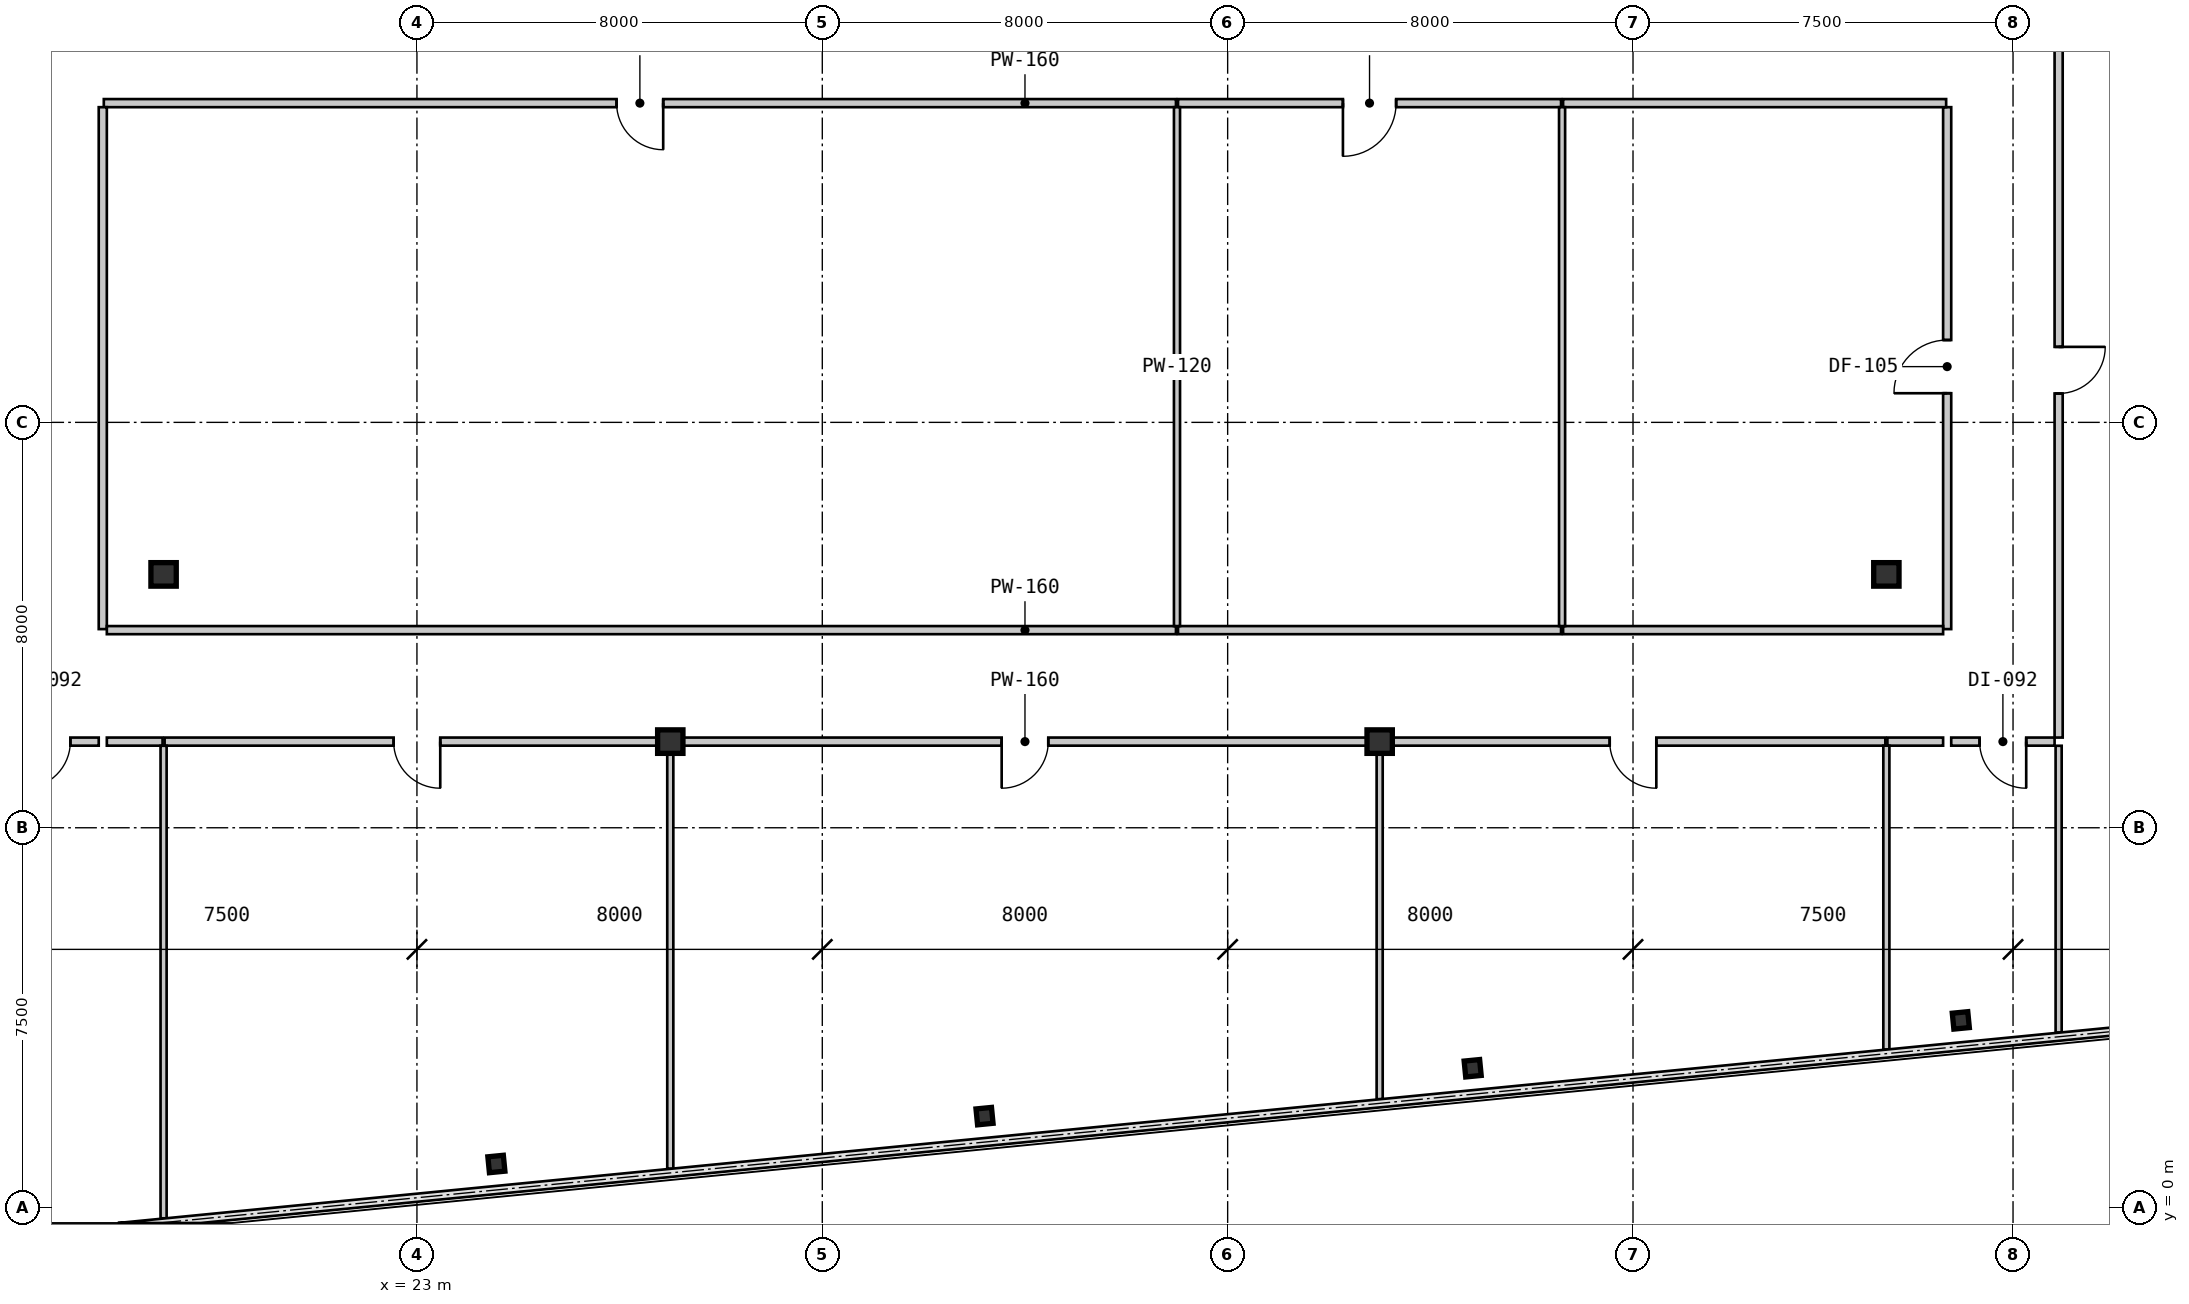
"""IFC4 building model, lengths in metres.
Left out: names, types, materials, properties, quantities, classifications, styles, units other than length and angle.
Written with IfcOpenShell. Run it as: python <this file> out.ifc"""

import sys

from ifc_helpers import new_model, si_unit, direction, frame, frame_2d, origin, origin_2d, place, context, subcontext, project, spatial, rectangle, i_section, extrude, source, transform, mapped, element, fill, save


model = new_model("IFC4")
c1 = context("Model", 3, precision=1e-05, world=origin(), true_north=direction((0.0, 1.0)))
c2 = subcontext(c1, "Body", "Model", "MODEL_VIEW")
j1 = project(units=[si_unit("LENGTHUNIT", "METRE"), si_unit("PLANEANGLEUNIT", "RADIAN")], contexts=[c1])
p1 = place(None, origin())
s1 = spatial("IfcSite", under=j1, at=p1, CompositionType="ELEMENT")
p2 = place(p1, origin())
s2 = spatial("IfcBuilding", under=s1, at=p2, CompositionType="ELEMENT")
p3 = place(p2, frame((0.0, 0.0, 106.05)))
s3 = spatial("IfcBuildingStorey", under=s2, at=p3, CompositionType="ELEMENT", Elevation=106.05)
m1 = source(origin(), c2, "Body", "SweptSolid", [
    extrude(i_section(OverallWidth=0.5, OverallDepth=0.464, WebThickness=0.022, FlangeThickness=0.034, at=origin_2d()), origin(), (0.0, 0.0, 1.0), 3.15),
])
for number, where, z_axis, x_axis in (
    (1, (28.0, 9.2, 0.0), (0.0, 0.0, 1.0), (1.0, 0.0, 0.0)),
    (2, (42.0, 9.2, 0.0), (0.0, 0.0, 1.0), (1.0, 0.0, 0.0)),
    (3, (18.0, 12.5, 0.0), (0.0, 0.0, 1.0), (1.0, 0.0, 0.0)),
    (4, (52.0, 12.5, 0.0), (0.0, 0.0, 1.0), (1.0, 0.0, 0.0)),
):
    element("IfcColumn", number, at=place(p3, frame(where, z_axis=z_axis, x_axis=x_axis)), inside=s3, PredefinedType="COLUMN", context=c2, shape_type="MappedRepresentation", body=[
        mapped(m1, transform((0.0, 0.0, 0.0), scale=1.0)),
    ])
m2 = source(origin(), c2, "Body", "SweptSolid", [
    extrude(i_section(OverallWidth=0.307, OverallDepth=0.315, WebThickness=0.012, FlangeThickness=0.019, at=origin_2d()), origin(), (0.0, 0.0, 1.0), 3.15),
])
for number, where, z_axis, x_axis in (
    (5, (24.568, 0.865, 0.0), (0.0, 0.0, 1.0), (0.995, 0.098, 0.0)),
    (6, (34.202, 1.809, 0.0), (0.0, 0.0, 1.0), (0.995, 0.098, 0.0)),
    (7, (43.835, 2.754, 0.0), (0.0, 0.0, 1.0), (0.995, 0.098, 0.0)),
    (8, (53.469, 3.698, 0.0), (0.0, 0.0, 1.0), (0.995, 0.098, 0.0)),
):
    element("IfcColumn", number, at=place(p3, frame(where, z_axis=z_axis, x_axis=x_axis)), inside=s3, PredefinedType="COLUMN", context=c2, shape_type="MappedRepresentation", body=[
        mapped(m2, transform((0.0, 0.0, 0.0), scale=1.0)),
    ])
m3 = source(origin(), c2, "Body", "SweptSolid", [
    extrude(rectangle(XDim=21.159, YDim=0.16, at=frame_2d((10.58, 0.0))), origin(), (0.0, 0.0, 1.0), 2.93),
])
p4 = place(p3, frame((37.98, 21.8, 0.0), z_axis=(0.0, 0.0, 1.0), x_axis=(-1.0, 0.0, 0.0)))
e9 = element("IfcWall", 9, at=p4, inside=s3, PredefinedType="PARTITIONING", context=c2, shape_type="MappedRepresentation", body=[
    mapped(m3, transform((0.0, 0.0, 0.0), scale=1.0)),
])
m4 = source(origin(), c2, "Body", "SweptSolid", [
    extrude(rectangle(XDim=0.92, YDim=2.1, at=frame_2d((0.46, 1.05))), frame((0.0, 0.09, 0.0), z_axis=(0.0, -1.0, 0.0), x_axis=(1.0, 0.0, 0.0)), (0.0, 0.0, 1.0), 0.18),
])
p5 = place(p4, frame((10.12, 0.0, 0.0)))
e10 = element("IfcOpeningElement", 10, at=p5, cuts=e9, PredefinedType="OPENING", context=c2, shape_type="MappedRepresentation", body=[
    mapped(m4, transform((0.0, 0.0, 0.0), scale=1.0)),
])
m5 = source(origin(), c2, "Body", "SweptSolid", [
    extrude(rectangle(XDim=10.3, YDim=0.16, at=frame_2d((5.15, 0.0))), origin(), (0.0, 0.0, 1.0), 2.93),
])
p6 = place(p3, frame((16.8, 21.72, 0.0), z_axis=(0.0, 0.0, 1.0), x_axis=(0.0, -1.0, 0.0)))
e11 = element("IfcWall", 11, at=p6, inside=s3, PredefinedType="PARTITIONING", context=c2, shape_type="MappedRepresentation", body=[
    mapped(m5, transform((0.0, 0.0, 0.0), scale=1.0)),
])
m6 = source(origin(), c2, "Body", "SweptSolid", [
    extrude(rectangle(XDim=7.56, YDim=0.16, at=frame_2d((3.78, 0.0))), origin(), (0.0, 0.0, 1.0), 2.93),
])
p7 = place(p3, frame((45.58, 21.8, 0.0), z_axis=(0.0, 0.0, 1.0), x_axis=(-1.0, 0.0, 0.0)))
e12 = element("IfcWall", 12, at=p7, inside=s3, PredefinedType="PARTITIONING", context=c2, shape_type="MappedRepresentation", body=[
    mapped(m6, transform((0.0, 0.0, 0.0), scale=1.0)),
])
m7 = source(origin(), c2, "Body", "SweptSolid", [
    extrude(rectangle(XDim=1.05, YDim=2.1, at=frame_2d((0.525, 1.05))), frame((0.0, 0.09, 0.0), z_axis=(0.0, -1.0, 0.0), x_axis=(1.0, 0.0, 0.0)), (0.0, 0.0, 1.0), 0.18),
])
p8 = place(p7, frame((3.255, 0.0, 0.0)))
e13 = element("IfcOpeningElement", 13, at=p8, cuts=e12, PredefinedType="OPENING", context=c2, shape_type="MappedRepresentation", body=[
    mapped(m7, transform((0.0, 0.0, 0.0), scale=1.0)),
])
p9 = place(p3, frame((53.2, 11.42, 0.0), z_axis=(0.0, 0.0, 1.0), x_axis=(0.0, 1.0, 0.0)))
e14 = element("IfcWall", 14, at=p9, inside=s3, PredefinedType="PARTITIONING", context=c2, shape_type="MappedRepresentation", body=[
    mapped(m5, transform((0.0, 0.0, 0.0), scale=1.0)),
])
p10 = place(p9, frame((4.655, 0.0, 0.0)))
e15 = element("IfcOpeningElement", 15, at=p10, cuts=e14, PredefinedType="OPENING", context=c2, shape_type="MappedRepresentation", body=[
    mapped(m7, transform((0.0, 0.0, 0.0), scale=1.0)),
])
p11 = place(p3, frame((53.18, 21.8, 0.0), z_axis=(0.0, 0.0, 1.0), x_axis=(-1.0, 0.0, 0.0)))
e16 = element("IfcWall", 16, at=p11, inside=s3, PredefinedType="PARTITIONING", context=c2, shape_type="MappedRepresentation", body=[
    mapped(m6, transform((0.0, 0.0, 0.0), scale=1.0)),
])
m8 = source(origin(), c2, "Body", "SweptSolid", [
    extrude(rectangle(XDim=2.04, YDim=0.16, at=frame_2d((1.02, 0.0))), origin(), (0.0, 0.0, 1.0), 2.93),
])
p12 = place(p3, frame((16.72, 9.2, 0.0), z_axis=(0.0, 0.0, 1.0), x_axis=(-1.0, 0.0, 0.0)))
e17 = element("IfcWall", 17, at=p12, inside=s3, PredefinedType="PARTITIONING", context=c2, shape_type="MappedRepresentation", body=[
    mapped(m8, transform((0.0, 0.0, 0.0), scale=1.0)),
])
p13 = place(p12, frame((0.56, 0.0, 0.0)))
e18 = element("IfcOpeningElement", 18, at=p13, cuts=e17, PredefinedType="OPENING", context=c2, shape_type="MappedRepresentation", body=[
    mapped(m4, transform((0.0, 0.0, 0.0), scale=1.0)),
])
p14 = place(p3, frame((55.32, 9.2, 0.0), z_axis=(0.0, 0.0, 1.0), x_axis=(-1.0, 0.0, 0.0)))
e19 = element("IfcWall", 19, at=p14, inside=s3, PredefinedType="PARTITIONING", context=c2, shape_type="MappedRepresentation", body=[
    mapped(m8, transform((0.0, 0.0, 0.0), scale=1.0)),
])
p15 = place(p14, frame((0.56, 0.0, 0.0)))
e20 = element("IfcOpeningElement", 20, at=p15, cuts=e19, PredefinedType="OPENING", context=c2, shape_type="MappedRepresentation", body=[
    mapped(m4, transform((0.0, 0.0, 0.0), scale=1.0)),
])
m9 = source(origin(), c2, "Body", "SweptSolid", [
    extrude(rectangle(XDim=14.5, YDim=0.16, at=frame_2d((7.25, 0.0))), origin(), (0.0, 0.0, 1.0), 2.93),
])
p16 = place(p3, frame((55.4, 23.78, 0.0), z_axis=(0.0, 0.0, 1.0), x_axis=(0.0, -1.0, 0.0)))
e21 = element("IfcWall", 21, at=p16, inside=s3, PredefinedType="PARTITIONING", context=c2, shape_type="MappedRepresentation", body=[
    mapped(m9, transform((0.0, 0.0, 0.0), scale=1.0)),
])
p17 = place(p16, frame((6.79, 0.0, 0.0)))
e22 = element("IfcOpeningElement", 22, at=p17, cuts=e21, PredefinedType="OPENING", context=c2, shape_type="MappedRepresentation", body=[
    mapped(m4, transform((0.0, 0.0, 0.0), scale=1.0)),
])
m10 = source(origin(), c2, "Body", "SweptSolid", [
    extrude(rectangle(XDim=21.1, YDim=0.16, at=frame_2d((10.55, 0.0))), origin(), (0.0, 0.0, 1.0), 2.93),
])
p18 = place(p3, frame((16.88, 11.4, 0.0), z_axis=(0.0, 0.0, 1.0), x_axis=(1.0, 0.0, 0.0)))
e23 = element("IfcWall", 23, at=p18, inside=s3, PredefinedType="PARTITIONING", context=c2, shape_type="MappedRepresentation", body=[
    mapped(m10, transform((0.0, 0.0, 0.0), scale=1.0)),
])
p19 = place(p3, frame((38.02, 11.4, 0.0), z_axis=(0.0, 0.0, 1.0), x_axis=(1.0, 0.0, 0.0)))
e24 = element("IfcWall", 24, at=p19, inside=s3, PredefinedType="PARTITIONING", context=c2, shape_type="MappedRepresentation", body=[
    mapped(m6, transform((0.0, 0.0, 0.0), scale=1.0)),
])
m11 = source(origin(), c2, "Body", "SweptSolid", [
    extrude(rectangle(XDim=7.5, YDim=0.16, at=frame_2d((3.75, 0.0))), origin(), (0.0, 0.0, 1.0), 2.93),
])
p20 = place(p3, frame((45.62, 11.4, 0.0), z_axis=(0.0, 0.0, 1.0), x_axis=(1.0, 0.0, 0.0)))
e25 = element("IfcWall", 25, at=p20, inside=s3, PredefinedType="PARTITIONING", context=c2, shape_type="MappedRepresentation", body=[
    mapped(m11, transform((0.0, 0.0, 0.0), scale=1.0)),
])
m12 = source(origin(), c2, "Body", "SweptSolid", [
    extrude(rectangle(XDim=1.1, YDim=0.16, at=frame_2d((0.55, 0.0))), origin(), (0.0, 0.0, 1.0), 2.93),
])
p21 = place(p3, frame((17.98, 9.2, 0.0), z_axis=(0.0, 0.0, 1.0), x_axis=(-1.0, 0.0, 0.0)))
e26 = element("IfcWall", 26, at=p21, inside=s3, PredefinedType="PARTITIONING", context=c2, shape_type="MappedRepresentation", body=[
    mapped(m12, transform((0.0, 0.0, 0.0), scale=1.0)),
])
m13 = source(origin(), c2, "Body", "SweptSolid", [
    extrude(rectangle(XDim=9.959, YDim=0.16, at=frame_2d((4.98, 0.0))), origin(), (0.0, 0.0, 1.0), 2.93),
])
p22 = place(p3, frame((27.98, 9.2, 0.0), z_axis=(0.0, 0.0, 1.0), x_axis=(-1.0, 0.0, 0.0)))
e27 = element("IfcWall", 27, at=p22, inside=s3, PredefinedType="PARTITIONING", context=c2, shape_type="MappedRepresentation", body=[
    mapped(m13, transform((0.0, 0.0, 0.0), scale=1.0)),
])
p23 = place(p22, frame((4.52, 0.0, 0.0)))
e28 = element("IfcOpeningElement", 28, at=p23, cuts=e27, PredefinedType="OPENING", context=c2, shape_type="MappedRepresentation", body=[
    mapped(m4, transform((0.0, 0.0, 0.0), scale=1.0)),
])
m14 = source(origin(), c2, "Body", "SweptSolid", [
    extrude(rectangle(XDim=13.959, YDim=0.16, at=frame_2d((6.98, 0.0))), origin(), (0.0, 0.0, 1.0), 2.328),
])
p24 = place(p3, frame((41.98, 9.2, 0.0), z_axis=(0.0, 0.0, 1.0), x_axis=(-1.0, 0.0, 0.0)))
e29 = element("IfcWall", 29, at=p24, inside=s3, PredefinedType="PARTITIONING", context=c2, shape_type="MappedRepresentation", body=[
    mapped(m14, transform((0.0, 0.0, 0.0), scale=1.0)),
])
p25 = place(p24, frame((6.52, 0.0, 0.0)))
e30 = element("IfcOpeningElement", 30, at=p25, cuts=e29, PredefinedType="OPENING", context=c2, shape_type="MappedRepresentation", body=[
    mapped(m4, transform((0.0, 0.0, 0.0), scale=1.0)),
])
p26 = place(p3, frame((51.98, 9.2, 0.0), z_axis=(0.0, 0.0, 1.0), x_axis=(-1.0, 0.0, 0.0)))
e31 = element("IfcWall", 31, at=p26, inside=s3, PredefinedType="PARTITIONING", context=c2, shape_type="MappedRepresentation", body=[
    mapped(m13, transform((0.0, 0.0, 0.0), scale=1.0)),
])
p27 = place(p26, frame((4.52, 0.0, 0.0)))
e32 = element("IfcOpeningElement", 32, at=p27, cuts=e31, PredefinedType="OPENING", context=c2, shape_type="MappedRepresentation", body=[
    mapped(m4, transform((0.0, 0.0, 0.0), scale=1.0)),
])
p28 = place(p3, frame((53.12, 9.2, 0.0), z_axis=(0.0, 0.0, 1.0), x_axis=(-1.0, 0.0, 0.0)))
e33 = element("IfcWall", 33, at=p28, inside=s3, PredefinedType="PARTITIONING", context=c2, shape_type="MappedRepresentation", body=[
    mapped(m12, transform((0.0, 0.0, 0.0), scale=1.0)),
])
m15 = source(origin(), c2, "Body", "SweptSolid", [
    extrude(rectangle(XDim=10.24, YDim=0.12, at=frame_2d((5.12, 0.0))), origin(), (0.0, 0.0, 1.0), 2.93),
])
for number, where, z_axis, x_axis in (
    (34, (38.0, 21.72, 0.0), (0.0, 0.0, 1.0), (0.0, -1.0, 0.0)),
    (35, (45.6, 21.72, 0.0), (0.0, 0.0, 1.0), (0.0, -1.0, 0.0)),
):
    element("IfcWall", number, at=place(p3, frame(where, z_axis=z_axis, x_axis=x_axis)), inside=s3, PredefinedType="PARTITIONING", context=c2, shape_type="MappedRepresentation", body=[
        mapped(m15, transform((0.0, 0.0, 0.0), scale=1.0)),
    ])
m16 = source(origin(), c2, "Body", "SweptSolid", [
    extrude(rectangle(XDim=9.325, YDim=0.12, at=frame_2d((4.663, 0.0))), origin(), (0.0, 0.0, 1.0), 2.93),
])
p29 = place(p3, frame((18.0, 9.118, 0.0), z_axis=(0.0, 0.0, 1.0), x_axis=(0.0, -1.0, 0.0)))
e36 = element("IfcWall", 36, at=p29, inside=s3, PredefinedType="PARTITIONING", context=c2, shape_type="MappedRepresentation", body=[
    mapped(m16, transform((0.0, 0.0, 0.0), scale=1.0)),
])
m17 = source(origin(), c2, "Body", "SweptSolid", [
    extrude(rectangle(XDim=8.349, YDim=0.12, at=frame_2d((4.174, 0.0))), origin(), (0.0, 0.0, 1.0), 2.93),
])
p30 = place(p3, frame((28.0, 9.12, 0.0), z_axis=(0.0, 0.0, 1.0), x_axis=(0.0, -1.0, 0.0)))
e37 = element("IfcWall", 37, at=p30, inside=s3, PredefinedType="PARTITIONING", context=c2, shape_type="MappedRepresentation", body=[
    mapped(m17, transform((0.0, 0.0, 0.0), scale=1.0)),
])
m18 = source(origin(), c2, "Body", "SweptSolid", [
    extrude(rectangle(XDim=6.976, YDim=0.12, at=frame_2d((3.488, 0.0))), origin(), (0.0, 0.0, 1.0), 2.93),
])
p31 = place(p3, frame((42.0, 9.12, 0.0), z_axis=(0.0, 0.0, 1.0), x_axis=(0.0, -1.0, 0.0)))
e38 = element("IfcWall", 38, at=p31, inside=s3, PredefinedType="PARTITIONING", context=c2, shape_type="MappedRepresentation", body=[
    mapped(m18, transform((0.0, 0.0, 0.0), scale=1.0)),
])
m19 = source(origin(), c2, "Body", "SweptSolid", [
    extrude(rectangle(XDim=5.996, YDim=0.12, at=frame_2d((2.998, 0.0))), origin(), (0.0, 0.0, 1.0), 2.93),
])
p32 = place(p3, frame((52.0, 9.12, 0.0), z_axis=(0.0, 0.0, 1.0), x_axis=(0.0, -1.0, 0.0)))
e39 = element("IfcWall", 39, at=p32, inside=s3, PredefinedType="PARTITIONING", context=c2, shape_type="MappedRepresentation", body=[
    mapped(m19, transform((0.0, 0.0, 0.0), scale=1.0)),
])
m20 = source(origin(), c2, "Body", "SweptSolid", [
    extrude(rectangle(XDim=5.658, YDim=0.12, at=frame_2d((2.829, 0.0))), origin(), (0.0, 0.0, 1.0), 2.93),
])
p33 = place(p3, frame((55.4, 9.118, 0.0), z_axis=(0.0, 0.0, 1.0), x_axis=(0.0, -1.0, 0.0)))
e40 = element("IfcWall", 40, at=p33, inside=s3, PredefinedType="PARTITIONING", context=c2, shape_type="MappedRepresentation", body=[
    mapped(m20, transform((0.0, 0.0, 0.0), scale=1.0)),
])
m21 = source(origin(), c2, "Body", "SweptSolid", [
    extrude(rectangle(XDim=0.92, YDim=2.1, at=frame_2d((0.46, 1.05))), frame((0.0, 0.025, 0.0), z_axis=(0.0, -1.0, 0.0), x_axis=(1.0, 0.0, 0.0)), (0.0, 0.0, 1.0), 0.05),
])
p34 = place(p5, origin())
e41 = element("IfcDoor", 41, at=p34, inside=s3, OperationType="SINGLE_SWING_LEFT", PredefinedType="DOOR", context=c2, shape_type="MappedRepresentation", body=[
    mapped(m21, transform((0.0, 0.0, 0.0), scale=1.0)),
])
fill(e10, e41)
m22 = source(origin(), c2, "Body", "SweptSolid", [
    extrude(rectangle(XDim=1.05, YDim=2.1, at=frame_2d((0.525, 1.05))), frame((0.0, 0.025, 0.0), z_axis=(0.0, -1.0, 0.0), x_axis=(1.0, 0.0, 0.0)), (0.0, 0.0, 1.0), 0.05),
])
p35 = place(p8, origin())
e42 = element("IfcDoor", 42, at=p35, inside=s3, OperationType="SINGLE_SWING_RIGHT", PredefinedType="DOOR", context=c2, shape_type="MappedRepresentation", body=[
    mapped(m22, transform((0.0, 0.0, 0.0), scale=1.0)),
])
fill(e13, e42)
p36 = place(p10, origin())
e43 = element("IfcDoor", 43, at=p36, inside=s3, OperationType="SINGLE_SWING_LEFT", PredefinedType="DOOR", context=c2, shape_type="MappedRepresentation", body=[
    mapped(m22, transform((0.0, 0.0, 0.0), scale=1.0)),
])
fill(e15, e43)
p37 = place(p13, origin())
e44 = element("IfcDoor", 44, at=p37, inside=s3, OperationType="SINGLE_SWING_RIGHT", PredefinedType="DOOR", context=c2, shape_type="MappedRepresentation", body=[
    mapped(m21, transform((0.0, 0.0, 0.0), scale=1.0)),
])
fill(e18, e44)
p38 = place(p15, origin())
e45 = element("IfcDoor", 45, at=p38, inside=s3, OperationType="SINGLE_SWING_LEFT", PredefinedType="DOOR", context=c2, shape_type="MappedRepresentation", body=[
    mapped(m21, transform((0.0, 0.0, 0.0), scale=1.0)),
])
fill(e20, e45)
p39 = place(p17, origin())
e46 = element("IfcDoor", 46, at=p39, inside=s3, OperationType="SINGLE_SWING_LEFT", PredefinedType="DOOR", context=c2, shape_type="MappedRepresentation", body=[
    mapped(m21, transform((0.0, 0.0, 0.0), scale=1.0)),
])
fill(e22, e46)
p40 = place(p23, origin())
e47 = element("IfcDoor", 47, at=p40, inside=s3, OperationType="SINGLE_SWING_LEFT", PredefinedType="DOOR", context=c2, shape_type="MappedRepresentation", body=[
    mapped(m21, transform((0.0, 0.0, 0.0), scale=1.0)),
])
fill(e28, e47)
p41 = place(p25, origin())
e48 = element("IfcDoor", 48, at=p41, inside=s3, OperationType="SINGLE_SWING_RIGHT", PredefinedType="DOOR", context=c2, shape_type="MappedRepresentation", body=[
    mapped(m21, transform((0.0, 0.0, 0.0), scale=1.0)),
])
fill(e30, e48)
p42 = place(p27, origin())
e49 = element("IfcDoor", 49, at=p42, inside=s3, OperationType="SINGLE_SWING_LEFT", PredefinedType="DOOR", context=c2, shape_type="MappedRepresentation", body=[
    mapped(m21, transform((0.0, 0.0, 0.0), scale=1.0)),
])
fill(e32, e49)
save(model, sys.argv[1])
